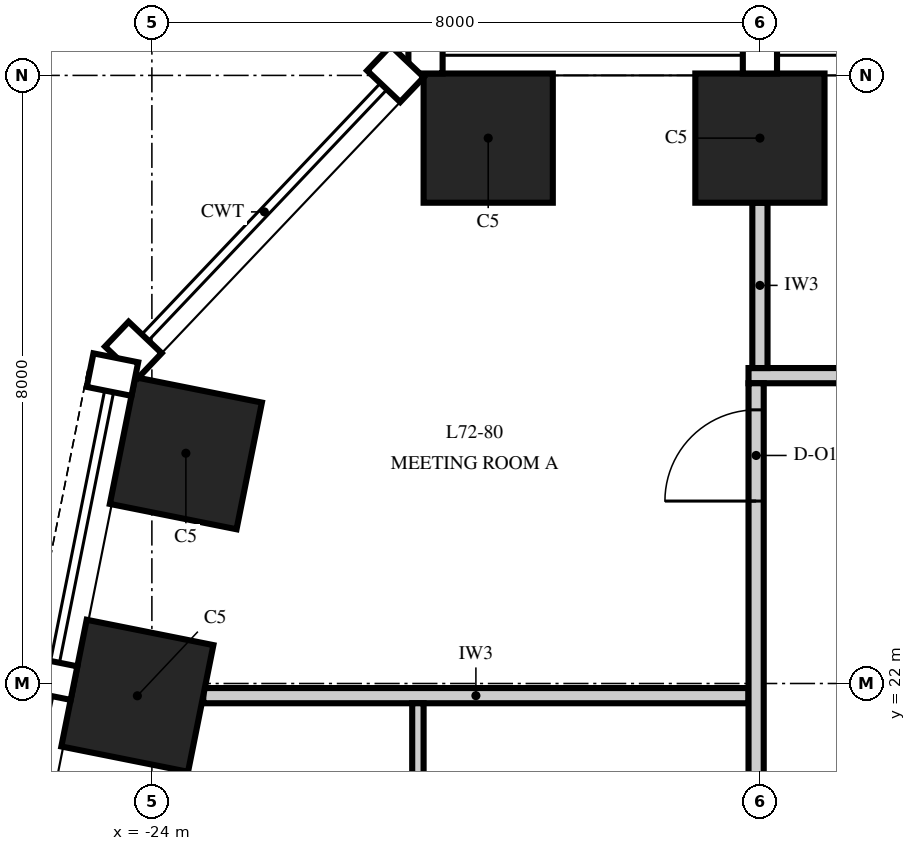
"""IFC4 building model, lengths in metres.
Left out: names, types, materials, properties, quantities, classifications, styles, units other than length and angle.
Written with IfcOpenShell. Run it as: python <this file> out.ifc"""

import sys

from ifc_helpers import new_model, si_unit, direction, frame, frame_2d, origin, origin_2d, place, context, subcontext, project, spatial, rectangle, extrude, element, fill, save


model = new_model("IFC4")
c1 = context("Model", 3, precision=1e-05, world=origin(), true_north=direction((0.0, 1.0)))
c2 = subcontext(c1, "Body", "Model", "MODEL_VIEW")
j1 = project(units=[si_unit("LENGTHUNIT", "METRE"), si_unit("PLANEANGLEUNIT", "RADIAN")], contexts=[c1])
p1 = place(None, origin())
s1 = spatial("IfcSite", under=j1, at=p1, CompositionType="ELEMENT")
p2 = place(p1, origin())
s2 = spatial("IfcBuilding", under=s1, at=p2, CompositionType="ELEMENT")
p3 = place(p2, frame((0.0, 0.0, 308.0)))
s3 = spatial("IfcBuildingStorey", under=s2, at=p3, CompositionType="ELEMENT", Elevation=308.0)
for number, where, z_axis, x_axis in (
    (1, (-16.0, 29.175, 0.0), (0.0, 0.0, 1.0), (-1.0, 0.0, 0.0)),
    (2, (-19.575, 29.175, 0.0), (0.0, 0.0, 1.0), (-1.0, 0.0, 0.0)),
    (3, (-23.553, 25.029, 0.0), (0.0, 0.0, 1.0), (-0.196, -0.981, 0.0)),
    (4, (-24.191, 21.838, 0.0), (0.0, 0.0, 1.0), (-0.196, -0.981, 0.0)),
):
    element("IfcColumn", number, at=place(p3, frame(where, z_axis=z_axis, x_axis=x_axis)), inside=s3, PredefinedType="COLUMN", context=c2, shape_type="SweptSolid", body=[
        extrude(rectangle(XDim=1.7, YDim=1.7, at=origin_2d()), origin(), (0.0, 0.0, 1.0), 4.0),
    ])
p4 = place(p3, frame((-23.324, 21.84, 0.0), z_axis=(0.0, 0.0, 1.0), x_axis=(1.0, 0.0, 0.0)))
e5 = element("IfcWall", 5, at=p4, inside=s3, PredefinedType="PARTITIONING", context=c2, shape_type="SweptSolid", body=[
    extrude(rectangle(XDim=7.174, YDim=0.2, at=frame_2d((3.587, 0.0))), origin(), (0.0, 0.0, 1.0), 3.23),
])
p5 = place(p3, frame((-16.15, 26.05, 0.0), z_axis=(0.0, 0.0, 1.0), x_axis=(1.0, 0.0, 0.0)))
e6 = element("IfcWall", 6, at=p5, inside=s3, PredefinedType="PARTITIONING", context=c2, shape_type="SweptSolid", body=[
    extrude(rectangle(XDim=32.3, YDim=0.2, at=frame_2d((16.15, 0.0))), origin(), (0.0, 0.0, 1.0), 3.418),
])
p6 = place(p5, frame((1.55, 0.0, 0.0)))
e7 = element("IfcOpeningElement", 7, at=p6, cuts=e6, PredefinedType="OPENING", context=c2, shape_type="SweptSolid", body=[
    extrude(rectangle(XDim=1.2, YDim=2.4, at=frame_2d((0.6, 1.2))), frame((0.0, 0.115, 0.0), z_axis=(0.0, -1.0, 0.0), x_axis=(1.0, 0.0, 0.0)), (0.0, 0.0, 1.0), 0.23),
])
p7 = place(p5, frame((5.55, 0.0, 0.0)))
e8 = element("IfcOpeningElement", 8, at=p7, cuts=e6, PredefinedType="OPENING", context=c2, shape_type="SweptSolid", body=[
    extrude(rectangle(XDim=1.2, YDim=2.4, at=frame_2d((0.6, 1.2))), frame((0.0, 0.115, 0.0), z_axis=(0.0, -1.0, 0.0), x_axis=(1.0, 0.0, 0.0)), (0.0, 0.0, 1.0), 0.23),
])
p8 = place(p5, frame((11.55, 0.0, 0.0)))
e9 = element("IfcOpeningElement", 9, at=p8, cuts=e6, PredefinedType="OPENING", context=c2, shape_type="SweptSolid", body=[
    extrude(rectangle(XDim=1.2, YDim=2.4, at=frame_2d((0.6, 1.2))), frame((0.0, 0.115, 0.0), z_axis=(0.0, -1.0, 0.0), x_axis=(1.0, 0.0, 0.0)), (0.0, 0.0, 1.0), 0.23),
])
p9 = place(p5, frame((17.55, 0.0, 0.0)))
e10 = element("IfcOpeningElement", 10, at=p9, cuts=e6, PredefinedType="OPENING", context=c2, shape_type="SweptSolid", body=[
    extrude(rectangle(XDim=1.2, YDim=2.4, at=frame_2d((0.6, 1.2))), frame((0.0, 0.115, 0.0), z_axis=(0.0, -1.0, 0.0), x_axis=(1.0, 0.0, 0.0)), (0.0, 0.0, 1.0), 0.23),
])
p10 = place(p5, frame((21.55, 0.0, 0.0)))
e11 = element("IfcOpeningElement", 11, at=p10, cuts=e6, PredefinedType="OPENING", context=c2, shape_type="SweptSolid", body=[
    extrude(rectangle(XDim=1.2, YDim=2.4, at=frame_2d((0.6, 1.2))), frame((0.0, 0.115, 0.0), z_axis=(0.0, -1.0, 0.0), x_axis=(1.0, 0.0, 0.0)), (0.0, 0.0, 1.0), 0.23),
])
p11 = place(p5, frame((27.55, 0.0, 0.0)))
e12 = element("IfcOpeningElement", 12, at=p11, cuts=e6, PredefinedType="OPENING", context=c2, shape_type="SweptSolid", body=[
    extrude(rectangle(XDim=1.2, YDim=2.4, at=frame_2d((0.6, 1.2))), frame((0.0, 0.115, 0.0), z_axis=(0.0, -1.0, 0.0), x_axis=(1.0, 0.0, 0.0)), (0.0, 0.0, 1.0), 0.23),
])
p12 = place(p3, frame((-20.5, 17.915, 0.0), z_axis=(0.0, 0.0, 1.0), x_axis=(0.0, 1.0, 0.0)))
e13 = element("IfcWall", 13, at=p12, inside=s3, PredefinedType="PARTITIONING", context=c2, shape_type="SweptSolid", body=[
    extrude(rectangle(XDim=3.825, YDim=0.15, at=frame_2d((1.913, 0.0))), origin(), (0.0, 0.0, 1.0), 3.23),
])
p13 = place(p12, frame((1.425, 0.0, 0.0)))
e14 = element("IfcOpeningElement", 14, at=p13, cuts=e13, PredefinedType="OPENING", context=c2, shape_type="SweptSolid", body=[
    extrude(rectangle(XDim=1.0, YDim=2.3, at=frame_2d((0.5, 1.15))), frame((0.0, 0.09, 0.0), z_axis=(0.0, -1.0, 0.0), x_axis=(1.0, 0.0, 0.0)), (0.0, 0.0, 1.0), 0.18),
])
p14 = place(p3, frame((-16.05, 9.9, 0.0), z_axis=(0.0, 0.0, 1.0), x_axis=(0.0, 1.0, 0.0)))
e15 = element("IfcWall", 15, at=p14, inside=s3, PredefinedType="PARTITIONING", context=c2, shape_type="SweptSolid", body=[
    extrude(rectangle(XDim=16.05, YDim=0.2, at=frame_2d((8.025, 0.0))), origin(), (0.0, 0.0, 1.0), 3.23),
])
p15 = place(p14, frame((14.5, 0.0, 0.0)))
e16 = element("IfcOpeningElement", 16, at=p15, cuts=e15, PredefinedType="OPENING", context=c2, shape_type="SweptSolid", body=[
    extrude(rectangle(XDim=1.2, YDim=2.4, at=frame_2d((0.6, 1.2))), frame((0.0, 0.115, 0.0), z_axis=(0.0, -1.0, 0.0), x_axis=(1.0, 0.0, 0.0)), (0.0, 0.0, 1.0), 0.23),
])
p16 = place(p14, frame((7.85, 0.0, 0.0)))
e17 = element("IfcOpeningElement", 17, at=p16, cuts=e15, PredefinedType="OPENING", context=c2, shape_type="SweptSolid", body=[
    extrude(rectangle(XDim=1.2, YDim=2.4, at=frame_2d((0.6, 1.2))), frame((0.0, 0.115, 0.0), z_axis=(0.0, -1.0, 0.0), x_axis=(1.0, 0.0, 0.0)), (0.0, 0.0, 1.0), 0.23),
])
p17 = place(p3, frame((-16.0, 26.15, 0.0), z_axis=(0.0, 0.0, 1.0), x_axis=(0.0, 1.0, 0.0)))
e18 = element("IfcWall", 18, at=p17, inside=s3, PredefinedType="PARTITIONING", context=c2, shape_type="SweptSolid", body=[
    extrude(rectangle(XDim=2.175, YDim=0.2, at=frame_2d((1.087, 0.0))), origin(), (0.0, 0.0, 1.0), 3.418),
])
p18 = place(p15, origin())
e19 = element("IfcDoor", 19, at=p18, inside=s3, OperationType="SINGLE_SWING_LEFT", PredefinedType="DOOR", context=c2, shape_type="SweptSolid", body=[
    extrude(rectangle(XDim=1.2, YDim=2.4, at=frame_2d((0.6, 1.2))), frame((0.0, 0.1, 0.0), z_axis=(0.0, -1.0, 0.0), x_axis=(1.0, 0.0, 0.0)), (0.0, 0.0, 1.0), 0.199),
])
fill(e16, e19)
save(model, sys.argv[1])
